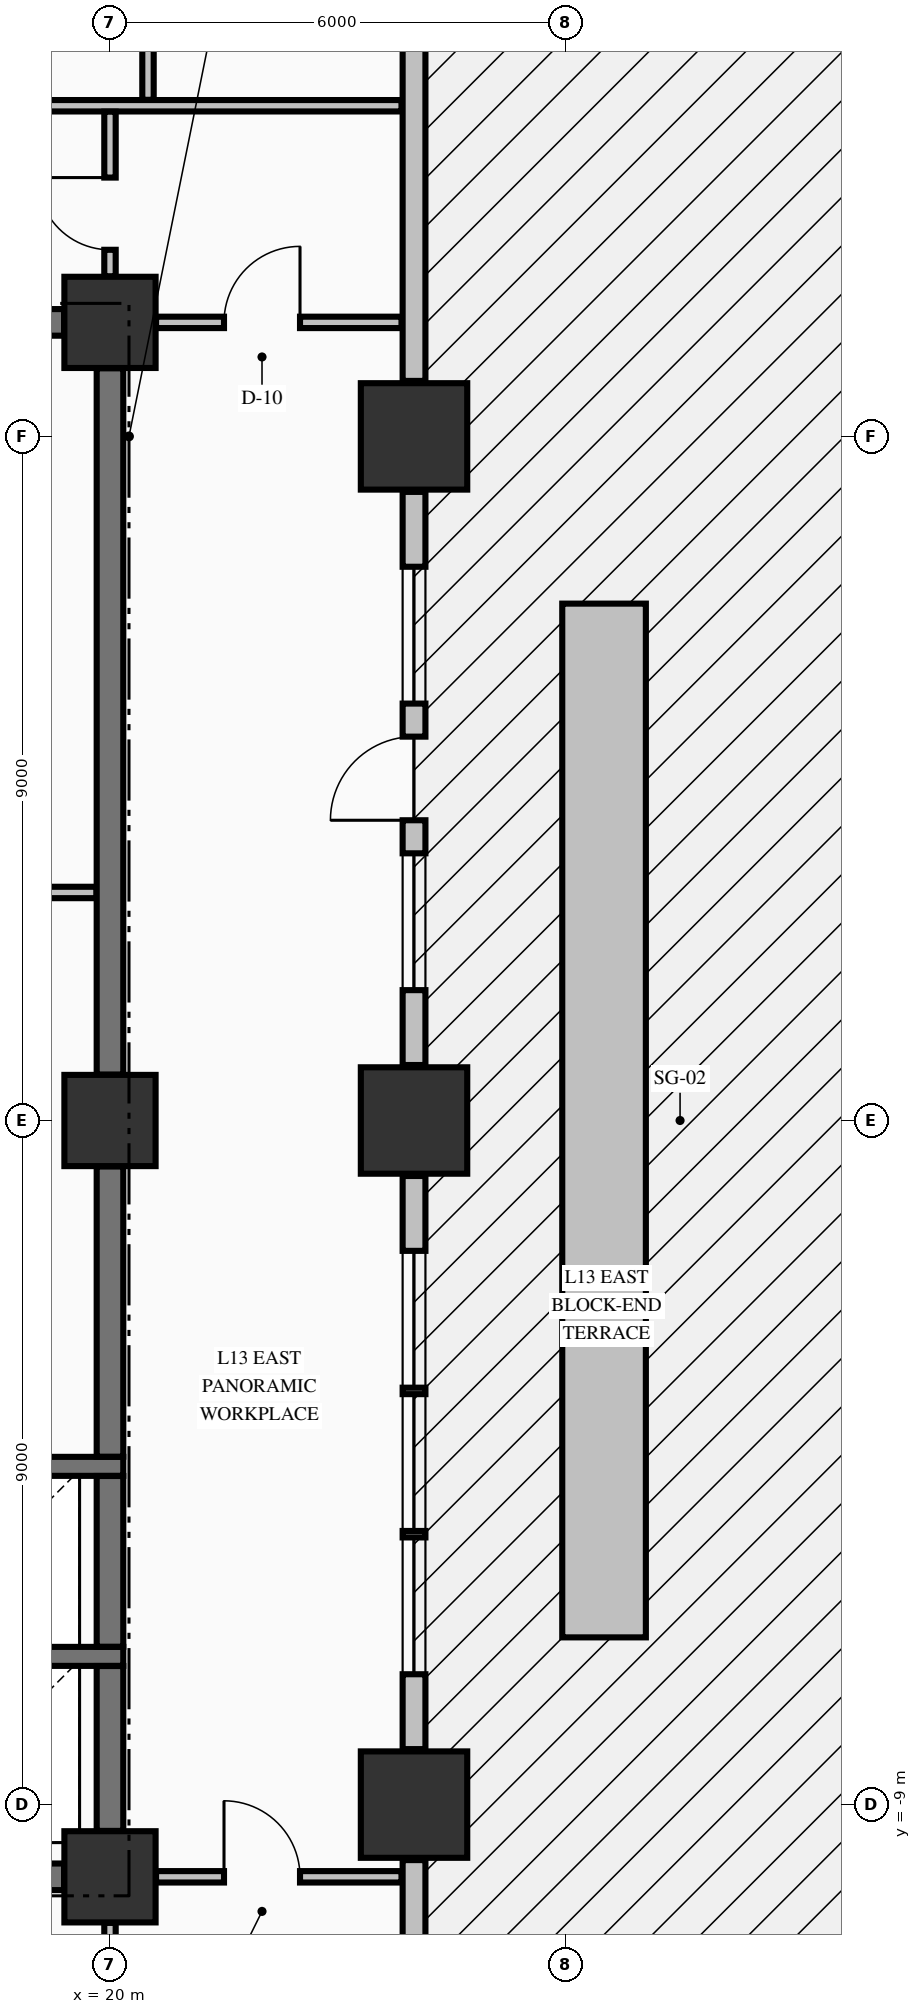
"""IFC4 building model, lengths in metres.
Left out: names, types, materials, properties, quantities, classifications, styles, units other than length and angle.
Written with IfcOpenShell. Run it as: python <this file> out.ifc"""

import sys

from ifc_helpers import new_model, si_unit, direction, frame, frame_2d, origin, origin_2d, place, context, subcontext, project, spatial, rectangle, extrude, element, fill, save


model = new_model("IFC4")
c1 = context("Model", 3, precision=1e-05, world=origin(), true_north=direction((0.0, 1.0)))
c2 = subcontext(c1, "Body", "Model", "MODEL_VIEW")
j1 = project(units=[si_unit("LENGTHUNIT", "METRE"), si_unit("PLANEANGLEUNIT", "RADIAN")], contexts=[c1])
p1 = place(None, origin())
s1 = spatial("IfcSite", under=j1, at=p1, CompositionType="ELEMENT")
p2 = place(p1, origin())
s2 = spatial("IfcBuilding", under=s1, at=p2, CompositionType="ELEMENT")
p3 = place(p2, frame((0.0, 0.0, 57.19)))
s3 = spatial("IfcBuildingStorey", under=s2, at=p3, CompositionType="ELEMENT", Elevation=57.19)
for number, where, z_axis, x_axis in (
    (1, (24.0, -9.0, -0.425), (0.0, 0.0, 1.0), (1.0, 0.0, 0.0)),
    (2, (24.0, 0.0, -0.425), (0.0, 0.0, 1.0), (1.0, 0.0, 0.0)),
    (3, (24.0, 9.0, -0.425), (0.0, 0.0, 1.0), (1.0, 0.0, 0.0)),
):
    element("IfcColumn", number, at=place(p3, frame(where, z_axis=z_axis, x_axis=x_axis)), inside=s3, PredefinedType="COLUMN", context=c2, shape_type="SweptSolid", body=[
        extrude(rectangle(XDim=1.4, YDim=1.4, at=origin_2d()), origin(), (0.0, 0.0, 1.0), 3.695),
    ])
for number, where, z_axis, x_axis in (
    (4, (20.0, -9.95, -0.425), (0.0, 0.0, 1.0), (1.0, 0.0, 0.0)),
    (5, (20.0, 10.5, -0.425), (0.0, 0.0, 1.0), (1.0, 0.0, 0.0)),
    (6, (20.0, 0.0, -0.425), (0.0, 0.0, 1.0), (1.0, 0.0, 0.0)),
):
    element("IfcColumn", number, at=place(p3, frame(where, z_axis=z_axis, x_axis=x_axis)), inside=s3, PredefinedType="COLUMN", context=c2, shape_type="SweptSolid", body=[
        extrude(rectangle(XDim=1.2, YDim=1.2, at=origin_2d()), origin(), (0.0, 0.0, 1.0), 3.695),
    ])
p4 = place(p3, frame((24.0, -22.27, 0.0), z_axis=(0.0, 0.0, 1.0), x_axis=(0.0, 1.0, 0.0)))
e7 = element("IfcWall", 7, at=p4, inside=s3, PredefinedType="STANDARD", context=c2, shape_type="SweptSolid", body=[
    extrude(rectangle(XDim=12.54, YDim=0.3, at=frame_2d((6.27, 0.0))), origin(), (0.0, 0.0, 1.0), 2.662),
])
p5 = place(p3, frame((24.0, -8.27, 0.0), z_axis=(0.0, 0.0, 1.0), x_axis=(0.0, 1.0, 0.0)))
e8 = element("IfcWall", 8, at=p5, inside=s3, PredefinedType="STANDARD", context=c2, shape_type="SweptSolid", body=[
    extrude(rectangle(XDim=7.54, YDim=0.3, at=frame_2d((3.77, 0.0))), origin(), (0.0, 0.0, 1.0), 2.662),
])
p6 = place(p5, frame((0.985, 0.0, 0.78)))
e9 = element("IfcOpeningElement", 9, at=p6, cuts=e8, PredefinedType="OPENING", context=c2, shape_type="SweptSolid", body=[
    extrude(rectangle(XDim=1.8, YDim=1.72, at=frame_2d((0.9, 0.86))), frame((0.0, 0.16, 0.0), z_axis=(0.0, -1.0, 0.0), x_axis=(1.0, 0.0, 0.0)), (0.0, 0.0, 1.0), 0.32),
])
p7 = place(p5, frame((2.87, 0.0, 0.78)))
e10 = element("IfcOpeningElement", 10, at=p7, cuts=e8, PredefinedType="OPENING", context=c2, shape_type="SweptSolid", body=[
    extrude(rectangle(XDim=1.8, YDim=1.72, at=frame_2d((0.9, 0.86))), frame((0.0, 0.16, 0.0), z_axis=(0.0, -1.0, 0.0), x_axis=(1.0, 0.0, 0.0)), (0.0, 0.0, 1.0), 0.32),
])
p8 = place(p5, frame((4.755, 0.0, 0.78)))
e11 = element("IfcOpeningElement", 11, at=p8, cuts=e8, PredefinedType="OPENING", context=c2, shape_type="SweptSolid", body=[
    extrude(rectangle(XDim=1.8, YDim=1.72, at=frame_2d((0.9, 0.86))), frame((0.0, 0.16, 0.0), z_axis=(0.0, -1.0, 0.0), x_axis=(1.0, 0.0, 0.0)), (0.0, 0.0, 1.0), 0.32),
])
p9 = place(p3, frame((24.0, 0.73, 0.0), z_axis=(0.0, 0.0, 1.0), x_axis=(0.0, 1.0, 0.0)))
e12 = element("IfcWall", 12, at=p9, inside=s3, PredefinedType="STANDARD", context=c2, shape_type="SweptSolid", body=[
    extrude(rectangle(XDim=7.54, YDim=0.3, at=frame_2d((3.77, 0.0))), origin(), (0.0, 0.0, 1.0), 2.662),
])
p10 = place(p9, frame((3.22, 0.0, 0.0)))
e13 = element("IfcOpeningElement", 13, at=p10, cuts=e12, PredefinedType="OPENING", context=c2, shape_type="SweptSolid", body=[
    extrude(rectangle(XDim=1.1, YDim=2.15, at=frame_2d((0.55, 1.075))), frame((0.0, 0.16, 0.0), z_axis=(0.0, -1.0, 0.0), x_axis=(1.0, 0.0, 0.0)), (0.0, 0.0, 1.0), 0.32),
])
p11 = place(p9, frame((0.985, 0.0, 0.78)))
e14 = element("IfcOpeningElement", 14, at=p11, cuts=e12, PredefinedType="OPENING", context=c2, shape_type="SweptSolid", body=[
    extrude(rectangle(XDim=1.8, YDim=1.72, at=frame_2d((0.9, 0.86))), frame((0.0, 0.16, 0.0), z_axis=(0.0, -1.0, 0.0), x_axis=(1.0, 0.0, 0.0)), (0.0, 0.0, 1.0), 0.32),
])
p12 = place(p9, frame((4.755, 0.0, 0.78)))
e15 = element("IfcOpeningElement", 15, at=p12, cuts=e12, PredefinedType="OPENING", context=c2, shape_type="SweptSolid", body=[
    extrude(rectangle(XDim=1.8, YDim=1.72, at=frame_2d((0.9, 0.86))), frame((0.0, 0.16, 0.0), z_axis=(0.0, -1.0, 0.0), x_axis=(1.0, 0.0, 0.0)), (0.0, 0.0, 1.0), 0.32),
])
p13 = place(p3, frame((24.0, 9.73, 0.0), z_axis=(0.0, 0.0, 1.0), x_axis=(0.0, 1.0, 0.0)))
e16 = element("IfcWall", 16, at=p13, inside=s3, PredefinedType="STANDARD", context=c2, shape_type="SweptSolid", body=[
    extrude(rectangle(XDim=12.54, YDim=0.3, at=frame_2d((6.27, 0.0))), origin(), (0.0, 0.0, 1.0), 2.662),
])
p14 = place(p3, frame((14.7, -9.95, 0.0), z_axis=(0.0, 0.0, 1.0), x_axis=(1.0, 0.0, 0.0)))
e17 = element("IfcWall", 17, at=p14, inside=s3, PredefinedType="SHEAR", context=c2, shape_type="SweptSolid", body=[
    extrude(rectangle(XDim=4.696, YDim=0.35, at=frame_2d((2.348, 0.0))), origin(), (0.0, 0.0, 1.0), 3.27),
])
p15 = place(p14, frame((0.8, 0.0, 0.0)))
e18 = element("IfcOpeningElement", 18, at=p15, cuts=e17, PredefinedType="OPENING", context=c2, shape_type="SweptSolid", body=[
    extrude(rectangle(XDim=0.9, YDim=2.15, at=frame_2d((0.45, 1.075))), frame((0.0, 0.185, 0.0), z_axis=(0.0, -1.0, 0.0), x_axis=(1.0, 0.0, 0.0)), (0.0, 0.0, 1.0), 0.37),
])
for number, where, z_axis, x_axis in (
    (19, (17.025, -7.05, 0.0), (0.0, 0.0, 1.0), (1.0, 0.0, 0.0)),
    (20, (17.025, -4.55, 0.0), (0.0, 0.0, 1.0), (1.0, 0.0, 0.0)),
):
    element("IfcWall", number, at=place(p3, frame(where, z_axis=z_axis, x_axis=x_axis)), inside=s3, PredefinedType="SOLIDWALL", context=c2, shape_type="SweptSolid", body=[
        extrude(rectangle(XDim=3.15, YDim=0.25, at=frame_2d((1.575, 0.0))), origin(), (0.0, 0.0, 1.0), 3.27),
    ])
p16 = place(p3, frame((14.7, 10.5, 0.0), z_axis=(0.0, 0.0, 1.0), x_axis=(1.0, 0.0, 0.0)))
e21 = element("IfcWall", 21, at=p16, inside=s3, PredefinedType="SHEAR", context=c2, shape_type="SweptSolid", body=[
    extrude(rectangle(XDim=4.696, YDim=0.35, at=frame_2d((2.348, 0.0))), origin(), (0.0, 0.0, 1.0), 3.27),
])
p17 = place(p16, frame((0.63, 0.0, 0.0)))
e22 = element("IfcOpeningElement", 22, at=p17, cuts=e21, PredefinedType="OPENING", context=c2, shape_type="SweptSolid", body=[
    extrude(rectangle(XDim=0.9, YDim=2.15, at=frame_2d((0.45, 1.075))), frame((0.0, 0.185, 0.0), z_axis=(0.0, -1.0, 0.0), x_axis=(1.0, 0.0, 0.0)), (0.0, 0.0, 1.0), 0.37),
])
p18 = place(p16, frame((3.27, 0.0, 0.0)))
e23 = element("IfcOpeningElement", 23, at=p18, cuts=e21, PredefinedType="OPENING", context=c2, shape_type="SweptSolid", body=[
    extrude(rectangle(XDim=0.9, YDim=2.15, at=frame_2d((0.45, 1.075))), frame((0.0, 0.185, 0.0), z_axis=(0.0, -1.0, 0.0), x_axis=(1.0, 0.0, 0.0)), (0.0, 0.0, 1.0), 0.37),
])
p19 = place(p3, frame((20.606, -9.95, 0.0), z_axis=(0.0, 0.0, 1.0), x_axis=(1.0, 0.0, 0.0)))
e24 = element("IfcWall", 24, at=p19, inside=s3, PredefinedType="PARTITIONING", context=c2, shape_type="SweptSolid", body=[
    extrude(rectangle(XDim=3.229, YDim=0.15, at=frame_2d((1.615, 0.0))), origin(), (0.0, 0.0, 1.0), 3.27),
])
p20 = place(p19, frame((0.894, 0.0, 0.0)))
e25 = element("IfcOpeningElement", 25, at=p20, cuts=e24, PredefinedType="OPENING", context=c2, shape_type="SweptSolid", body=[
    extrude(rectangle(XDim=1.0, YDim=2.15, at=frame_2d((0.5, 1.075))), frame((0.0, 0.085, 0.0), z_axis=(0.0, -1.0, 0.0), x_axis=(1.0, 0.0, 0.0)), (0.0, 0.0, 1.0), 0.17),
])
p21 = place(p3, frame((16.775, 3.0, 0.0), z_axis=(0.0, 0.0, 1.0), x_axis=(1.0, 0.0, 0.0)))
e26 = element("IfcWall", 26, at=p21, inside=s3, PredefinedType="PARTITIONING", context=c2, shape_type="SweptSolid", body=[
    extrude(rectangle(XDim=3.047, YDim=0.15, at=frame_2d((1.523, 0.0))), origin(), (0.0, 0.0, 1.0), 3.27),
])
p22 = place(p21, frame((1.17, 0.0, 0.0)))
e27 = element("IfcOpeningElement", 27, at=p22, cuts=e26, PredefinedType="OPENING", context=c2, shape_type="SweptSolid", body=[
    extrude(rectangle(XDim=0.95, YDim=2.15, at=frame_2d((0.475, 1.075))), frame((0.0, 0.085, 0.0), z_axis=(0.0, -1.0, 0.0), x_axis=(1.0, 0.0, 0.0)), (0.0, 0.0, 1.0), 0.17),
])
p23 = place(p3, frame((20.606, 10.5, 0.0), z_axis=(0.0, 0.0, 1.0), x_axis=(1.0, 0.0, 0.0)))
e28 = element("IfcWall", 28, at=p23, inside=s3, PredefinedType="PARTITIONING", context=c2, shape_type="SweptSolid", body=[
    extrude(rectangle(XDim=3.229, YDim=0.15, at=frame_2d((1.615, 0.0))), origin(), (0.0, 0.0, 1.0), 3.27),
])
p24 = place(p23, frame((0.894, 0.0, 0.0)))
e29 = element("IfcOpeningElement", 29, at=p24, cuts=e28, PredefinedType="OPENING", context=c2, shape_type="SweptSolid", body=[
    extrude(rectangle(XDim=1.0, YDim=2.15, at=frame_2d((0.5, 1.075))), frame((0.0, 0.085, 0.0), z_axis=(0.0, -1.0, 0.0), x_axis=(1.0, 0.0, 0.0)), (0.0, 0.0, 1.0), 0.17),
])
p25 = place(p3, frame((-28.835, 13.35, 0.0), z_axis=(0.0, 0.0, 1.0), x_axis=(1.0, 0.0, 0.0)))
e30 = element("IfcWall", 30, at=p25, inside=s3, PredefinedType="PARTITIONING", context=c2, shape_type="SweptSolid", body=[
    extrude(rectangle(XDim=52.67, YDim=0.15, at=frame_2d((26.335, 0.0))), origin(), (0.0, 0.0, 1.0), 3.27),
])
p26 = place(p25, frame((15.21, 0.0, 0.0)))
e31 = element("IfcOpeningElement", 31, at=p26, cuts=e30, PredefinedType="OPENING", context=c2, shape_type="SweptSolid", body=[
    extrude(rectangle(XDim=1.05, YDim=2.15, at=frame_2d((0.525, 1.075))), frame((0.0, 0.085, 0.0), z_axis=(0.0, -1.0, 0.0), x_axis=(1.0, 0.0, 0.0)), (0.0, 0.0, 1.0), 0.17),
])
p27 = place(p25, frame((31.26, 0.0, 0.0)))
e32 = element("IfcOpeningElement", 32, at=p27, cuts=e30, PredefinedType="OPENING", context=c2, shape_type="SweptSolid", body=[
    extrude(rectangle(XDim=1.05, YDim=2.15, at=frame_2d((0.525, 1.075))), frame((0.0, 0.085, 0.0), z_axis=(0.0, -1.0, 0.0), x_axis=(1.0, 0.0, 0.0)), (0.0, 0.0, 1.0), 0.17),
])
p28 = place(p25, frame((34.56, 0.0, 0.0)))
e33 = element("IfcOpeningElement", 33, at=p28, cuts=e30, PredefinedType="OPENING", context=c2, shape_type="SweptSolid", body=[
    extrude(rectangle(XDim=1.05, YDim=2.15, at=frame_2d((0.525, 1.075))), frame((0.0, 0.085, 0.0), z_axis=(0.0, -1.0, 0.0), x_axis=(1.0, 0.0, 0.0)), (0.0, 0.0, 1.0), 0.17),
])
p29 = place(p3, frame((20.0, -9.346, 0.0), z_axis=(0.0, 0.0, 1.0), x_axis=(0.0, 1.0, 0.0)))
e34 = element("IfcWall", 34, at=p29, inside=s3, PredefinedType="SHEAR", context=c2, shape_type="SweptSolid", body=[
    extrude(rectangle(XDim=2.169, YDim=0.35, at=frame_2d((1.084, 0.0))), origin(), (0.0, 0.0, 1.0), 3.27),
])
p30 = place(p3, frame((20.0, -6.923, 0.0), z_axis=(0.0, 0.0, 1.0), x_axis=(0.0, 1.0, 0.0)))
e35 = element("IfcWall", 35, at=p30, inside=s3, PredefinedType="SHEAR", context=c2, shape_type="SweptSolid", body=[
    extrude(rectangle(XDim=2.246, YDim=0.35, at=frame_2d((1.123, 0.0))), origin(), (0.0, 0.0, 1.0), 3.27),
])
p31 = place(p3, frame((20.0, -4.423, 0.0), z_axis=(0.0, 0.0, 1.0), x_axis=(0.0, 1.0, 0.0)))
e36 = element("IfcWall", 36, at=p31, inside=s3, PredefinedType="SHEAR", context=c2, shape_type="SweptSolid", body=[
    extrude(rectangle(XDim=3.819, YDim=0.35, at=frame_2d((1.91, 0.0))), origin(), (0.0, 0.0, 1.0), 3.27),
])
p32 = place(p3, frame((20.0, 0.604, 0.0), z_axis=(0.0, 0.0, 1.0), x_axis=(0.0, 1.0, 0.0)))
e37 = element("IfcWall", 37, at=p32, inside=s3, PredefinedType="SHEAR", context=c2, shape_type="SweptSolid", body=[
    extrude(rectangle(XDim=9.292, YDim=0.35, at=frame_2d((4.646, 0.0))), origin(), (0.0, 0.0, 1.0), 3.27),
])
p33 = place(p3, frame((20.0, -12.722, 0.0), z_axis=(0.0, 0.0, 1.0), x_axis=(0.0, 1.0, 0.0)))
e38 = element("IfcWall", 38, at=p33, inside=s3, PredefinedType="PARTITIONING", context=c2, shape_type="SweptSolid", body=[
    extrude(rectangle(XDim=2.166, YDim=0.15, at=frame_2d((1.083, 0.0))), origin(), (0.0, 0.0, 1.0), 3.27),
])
p34 = place(p33, frame((0.867, 0.0, 0.0)))
e39 = element("IfcOpeningElement", 39, at=p34, cuts=e38, PredefinedType="OPENING", context=c2, shape_type="SweptSolid", body=[
    extrude(rectangle(XDim=0.95, YDim=2.15, at=frame_2d((0.475, 1.075))), frame((0.0, 0.085, 0.0), z_axis=(0.0, -1.0, 0.0), x_axis=(1.0, 0.0, 0.0)), (0.0, 0.0, 1.0), 0.17),
])
p35 = place(p3, frame((20.0, 11.106, 0.0), z_axis=(0.0, 0.0, 1.0), x_axis=(0.0, 1.0, 0.0)))
e40 = element("IfcWall", 40, at=p35, inside=s3, PredefinedType="PARTITIONING", context=c2, shape_type="SweptSolid", body=[
    extrude(rectangle(XDim=2.166, YDim=0.15, at=frame_2d((1.083, 0.0))), origin(), (0.0, 0.0, 1.0), 3.27),
])
p36 = place(p35, frame((0.349, 0.0, 0.0)))
e41 = element("IfcOpeningElement", 41, at=p36, cuts=e40, PredefinedType="OPENING", context=c2, shape_type="SweptSolid", body=[
    extrude(rectangle(XDim=0.95, YDim=2.15, at=frame_2d((0.475, 1.075))), frame((0.0, 0.085, 0.0), z_axis=(0.0, -1.0, 0.0), x_axis=(1.0, 0.0, 0.0)), (0.0, 0.0, 1.0), 0.17),
])
p37 = place(p3, frame((20.5, 13.428, 0.0), z_axis=(0.0, 0.0, 1.0), x_axis=(0.0, 1.0, 0.0)))
e42 = element("IfcWall", 42, at=p37, inside=s3, PredefinedType="PARTITIONING", context=c2, shape_type="SweptSolid", body=[
    extrude(rectangle(XDim=8.866, YDim=0.15, at=frame_2d((4.433, 0.0))), origin(), (0.0, 0.0, 1.0), 3.27),
])
p38 = place(p3, frame((26.5, -6.8, -0.04), z_axis=(0.0, 0.0, 1.0), x_axis=(0.0, 1.0, 0.0)))
e43 = element("IfcWall", 43, at=p38, inside=s3, PredefinedType="PARAPET", context=c2, shape_type="SweptSolid", body=[
    extrude(rectangle(XDim=13.6, YDim=1.1, at=frame_2d((6.8, 0.0))), origin(), (0.0, 0.0, 1.0), 0.6),
])
p39 = place(p6, origin())
e44 = element("IfcWindow", 44, at=p39, inside=s3, PartitioningType="SINGLE_PANEL", PredefinedType="WINDOW", context=c2, shape_type="SweptSolid", body=[
    extrude(rectangle(XDim=1.8, YDim=1.72, at=frame_2d((0.9, 0.86))), frame((0.0, 0.03, 0.0), z_axis=(0.0, -1.0, 0.0), x_axis=(1.0, 0.0, 0.0)), (0.0, 0.0, 1.0), 0.06),
])
fill(e9, e44)
p40 = place(p7, origin())
e45 = element("IfcWindow", 45, at=p40, inside=s3, PartitioningType="SINGLE_PANEL", PredefinedType="WINDOW", context=c2, shape_type="SweptSolid", body=[
    extrude(rectangle(XDim=1.8, YDim=1.72, at=frame_2d((0.9, 0.86))), frame((0.0, 0.03, 0.0), z_axis=(0.0, -1.0, 0.0), x_axis=(1.0, 0.0, 0.0)), (0.0, 0.0, 1.0), 0.06),
])
fill(e10, e45)
p41 = place(p8, origin())
e46 = element("IfcWindow", 46, at=p41, inside=s3, PartitioningType="SINGLE_PANEL", PredefinedType="WINDOW", context=c2, shape_type="SweptSolid", body=[
    extrude(rectangle(XDim=1.8, YDim=1.72, at=frame_2d((0.9, 0.86))), frame((0.0, 0.03, 0.0), z_axis=(0.0, -1.0, 0.0), x_axis=(1.0, 0.0, 0.0)), (0.0, 0.0, 1.0), 0.06),
])
fill(e11, e46)
p42 = place(p10, origin())
e47 = element("IfcDoor", 47, at=p42, inside=s3, OperationType="SINGLE_SWING_LEFT", PredefinedType="DOOR", context=c2, shape_type="SweptSolid", body=[
    extrude(rectangle(XDim=1.1, YDim=2.15, at=frame_2d((0.55, 1.075))), frame((0.0, 0.025, 0.0), z_axis=(0.0, -1.0, 0.0), x_axis=(1.0, 0.0, 0.0)), (0.0, 0.0, 1.0), 0.05),
])
fill(e13, e47)
p43 = place(p11, origin())
e48 = element("IfcWindow", 48, at=p43, inside=s3, PartitioningType="SINGLE_PANEL", PredefinedType="WINDOW", context=c2, shape_type="SweptSolid", body=[
    extrude(rectangle(XDim=1.8, YDim=1.72, at=frame_2d((0.9, 0.86))), frame((0.0, 0.03, 0.0), z_axis=(0.0, -1.0, 0.0), x_axis=(1.0, 0.0, 0.0)), (0.0, 0.0, 1.0), 0.06),
])
fill(e14, e48)
p44 = place(p12, origin())
e49 = element("IfcWindow", 49, at=p44, inside=s3, PartitioningType="SINGLE_PANEL", PredefinedType="WINDOW", context=c2, shape_type="SweptSolid", body=[
    extrude(rectangle(XDim=1.8, YDim=1.72, at=frame_2d((0.9, 0.86))), frame((0.0, 0.03, 0.0), z_axis=(0.0, -1.0, 0.0), x_axis=(1.0, 0.0, 0.0)), (0.0, 0.0, 1.0), 0.06),
])
fill(e15, e49)
p45 = place(p36, origin())
e50 = element("IfcDoor", 50, at=p45, inside=s3, OperationType="SINGLE_SWING_RIGHT", PredefinedType="DOOR", context=c2, shape_type="SweptSolid", body=[
    extrude(rectangle(XDim=0.95, YDim=2.15, at=frame_2d((0.475, 1.075))), frame((0.0, 0.025, 0.0), z_axis=(0.0, -1.0, 0.0), x_axis=(1.0, 0.0, 0.0)), (0.0, 0.0, 1.0), 0.05),
])
fill(e41, e50)
p46 = place(p24, origin())
e51 = element("IfcDoor", 51, at=p46, inside=s3, OperationType="SINGLE_SWING_RIGHT", PredefinedType="DOOR", context=c2, shape_type="SweptSolid", body=[
    extrude(rectangle(XDim=1.0, YDim=2.15, at=frame_2d((0.5, 1.075))), frame((0.0, 0.025, 0.0), z_axis=(0.0, -1.0, 0.0), x_axis=(1.0, 0.0, 0.0)), (0.0, 0.0, 1.0), 0.05),
])
fill(e29, e51)
p47 = place(p20, origin())
e52 = element("IfcDoor", 52, at=p47, inside=s3, OperationType="SINGLE_SWING_LEFT", PredefinedType="DOOR", context=c2, shape_type="SweptSolid", body=[
    extrude(rectangle(XDim=1.0, YDim=2.15, at=frame_2d((0.5, 1.075))), frame((0.0, 0.025, 0.0), z_axis=(0.0, -1.0, 0.0), x_axis=(1.0, 0.0, 0.0)), (0.0, 0.0, 1.0), 0.05),
])
fill(e25, e52)
save(model, sys.argv[1])
